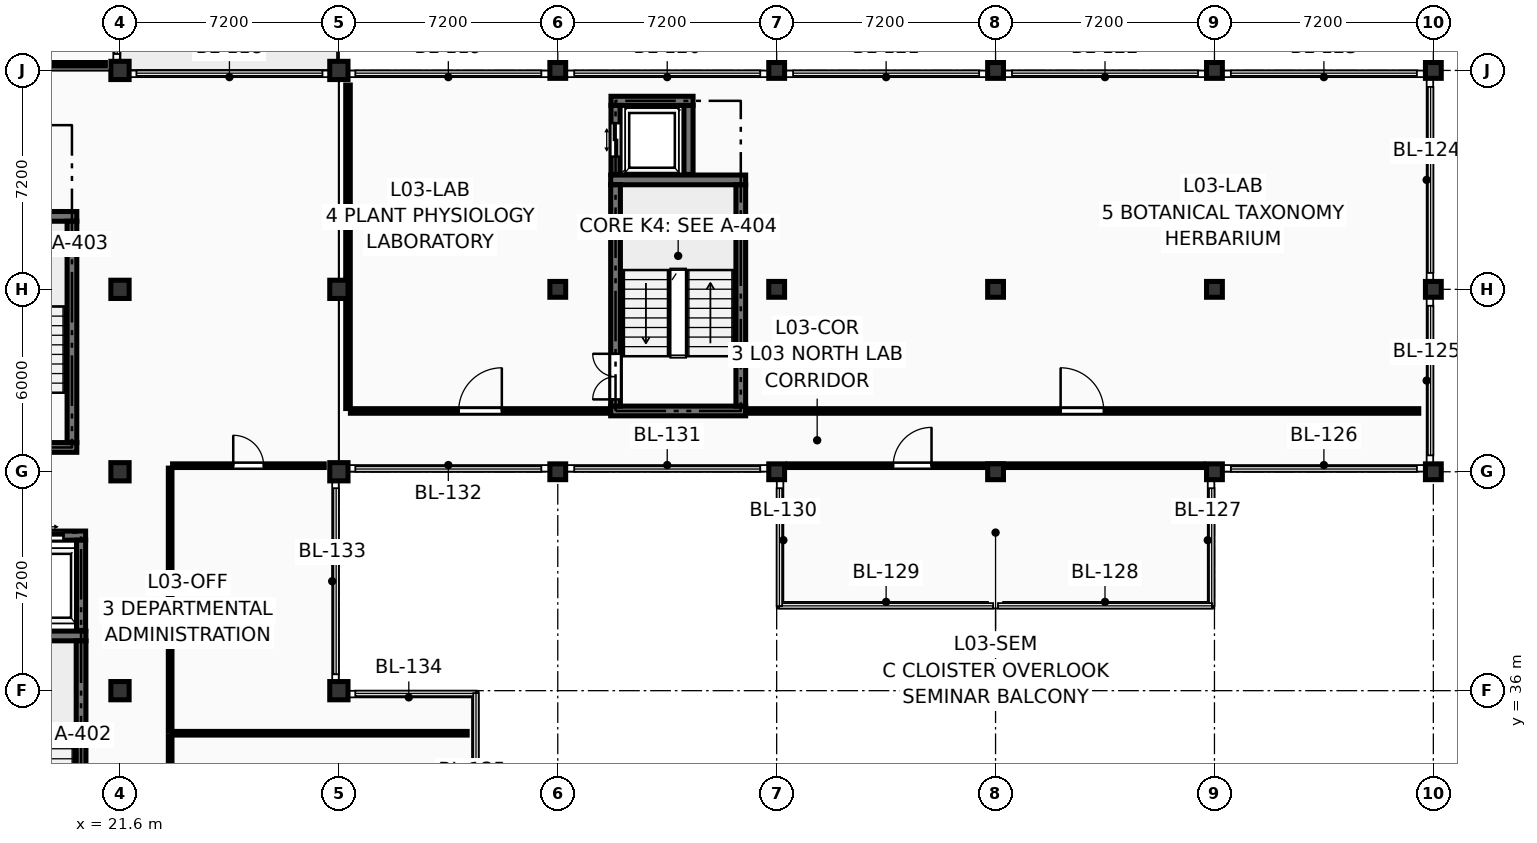
"""IFC4 building model, lengths in metres.
Left out: names, types, materials, properties, quantities, classifications, styles, units other than length and angle.
Written with IfcOpenShell. Run it as: python <this file> out.ifc"""

import sys

from ifc_helpers import new_model, si_unit, direction, frame, frame_2d, origin, origin_2d, place, context, subcontext, project, spatial, rectangle, extrude, element, fill, save


model = new_model("IFC4")
c1 = context("Model", 3, precision=1e-05, world=origin(), true_north=direction((0.0, 1.0)))
c2 = subcontext(c1, "Body", "Model", "MODEL_VIEW")
j1 = project(units=[si_unit("LENGTHUNIT", "METRE"), si_unit("PLANEANGLEUNIT", "RADIAN")], contexts=[c1])
p1 = place(None, origin())
s1 = spatial("IfcSite", under=j1, at=p1, CompositionType="ELEMENT")
p2 = place(p1, origin())
s2 = spatial("IfcBuilding", under=s1, at=p2, CompositionType="ELEMENT")
p3 = place(p2, frame((0.0, 0.0, 12.15)))
s3 = spatial("IfcBuildingStorey", under=s2, at=p3, CompositionType="ELEMENT", Elevation=12.15)
for number, where, z_axis, x_axis in (
    (1, (21.6, 36.0, 0.0), (0.0, 0.0, 1.0), (1.0, 0.0, 0.0)),
    (2, (21.6, 43.2, 0.0), (0.0, 0.0, 1.0), (1.0, 0.0, 0.0)),
    (3, (21.6, 49.2, 0.0), (0.0, 0.0, 1.0), (1.0, 0.0, 0.0)),
    (4, (21.6, 56.4, 0.0), (0.0, 0.0, 1.0), (1.0, 0.0, 0.0)),
    (5, (28.8, 36.0, 0.0), (0.0, 0.0, 1.0), (1.0, 0.0, 0.0)),
    (6, (28.8, 43.2, 0.0), (0.0, 0.0, 1.0), (1.0, 0.0, 0.0)),
    (7, (28.8, 49.2, 0.0), (0.0, 0.0, 1.0), (1.0, 0.0, 0.0)),
    (8, (28.8, 56.4, 0.0), (0.0, 0.0, 1.0), (1.0, 0.0, 0.0)),
):
    element("IfcColumn", number, at=place(p3, frame(where, z_axis=z_axis, x_axis=x_axis)), inside=s3, PredefinedType="COLUMN", context=c2, shape_type="SweptSolid", body=[
        extrude(rectangle(XDim=0.6, YDim=0.6, at=origin_2d()), origin(), (0.0, 0.0, 1.0), 3.6),
    ])
for number, where, z_axis, x_axis in (
    (9, (36.0, 43.2, 0.0), (0.0, 0.0, 1.0), (1.0, 0.0, 0.0)),
    (10, (36.0, 49.2, 0.0), (0.0, 0.0, 1.0), (1.0, 0.0, 0.0)),
    (11, (36.0, 56.4, 0.0), (0.0, 0.0, 1.0), (1.0, 0.0, 0.0)),
    (12, (43.2, 43.2, 0.0), (0.0, 0.0, 1.0), (1.0, 0.0, 0.0)),
    (13, (43.2, 49.2, 0.0), (0.0, 0.0, 1.0), (1.0, 0.0, 0.0)),
    (14, (43.2, 56.4, 0.0), (0.0, 0.0, 1.0), (1.0, 0.0, 0.0)),
    (15, (50.4, 43.2, 0.0), (0.0, 0.0, 1.0), (1.0, 0.0, 0.0)),
    (16, (50.4, 49.2, 0.0), (0.0, 0.0, 1.0), (1.0, 0.0, 0.0)),
    (17, (50.4, 56.4, 0.0), (0.0, 0.0, 1.0), (1.0, 0.0, 0.0)),
    (18, (57.6, 43.2, 0.0), (0.0, 0.0, 1.0), (1.0, 0.0, 0.0)),
    (19, (57.6, 49.2, 0.0), (0.0, 0.0, 1.0), (1.0, 0.0, 0.0)),
    (20, (57.6, 56.4, 0.0), (0.0, 0.0, 1.0), (1.0, 0.0, 0.0)),
    (21, (64.8, 43.2, 0.0), (0.0, 0.0, 1.0), (1.0, 0.0, 0.0)),
    (22, (64.8, 49.2, 0.0), (0.0, 0.0, 1.0), (1.0, 0.0, 0.0)),
    (23, (64.8, 56.4, 0.0), (0.0, 0.0, 1.0), (1.0, 0.0, 0.0)),
):
    element("IfcColumn", number, at=place(p3, frame(where, z_axis=z_axis, x_axis=x_axis)), inside=s3, PredefinedType="COLUMN", context=c2, shape_type="SweptSolid", body=[
        extrude(rectangle(XDim=0.52, YDim=0.52, at=origin_2d()), origin(), (0.0, 0.0, 1.0), 3.6),
    ])
p4 = place(p3, frame((15.64, 37.8, 0.0), z_axis=(0.0, 0.0, 1.0), x_axis=(1.0, 0.0, 0.0)))
e24 = element("IfcWall", 24, at=p4, inside=s3, PredefinedType="SHEAR", context=c2, shape_type="SweptSolid", body=[
    extrude(rectangle(XDim=4.84, YDim=0.32, at=frame_2d((2.42, 0.0))), origin(), (0.0, 0.0, 1.0), 3.39),
])
p5 = place(p3, frame((20.32, 29.96, 0.0), z_axis=(0.0, 0.0, 1.0), x_axis=(0.0, 1.0, 0.0)))
e25 = element("IfcWall", 25, at=p5, inside=s3, PredefinedType="SHEAR", context=c2, shape_type="SweptSolid", body=[
    extrude(rectangle(XDim=7.68, YDim=0.32, at=frame_2d((3.84, 0.0))), origin(), (0.0, 0.0, 1.0), 3.39),
])
for number, where, z_axis, x_axis in (
    (26, (15.74, 44.0, 0.0), (0.0, 0.0, 1.0), (1.0, 0.0, 0.0)),
    (27, (15.74, 51.6, 0.0), (0.0, 0.0, 1.0), (1.0, 0.0, 0.0)),
):
    element("IfcWall", number, at=place(p3, frame(where, z_axis=z_axis, x_axis=x_axis)), inside=s3, PredefinedType="SHEAR", context=c2, shape_type="SweptSolid", body=[
        extrude(rectangle(XDim=4.44, YDim=0.32, at=frame_2d((2.22, 0.0))), origin(), (0.0, 0.0, 1.0), 3.39),
    ])
p6 = place(p3, frame((20.02, 44.16, 0.0), z_axis=(0.0, 0.0, 1.0), x_axis=(0.0, 1.0, 0.0)))
e28 = element("IfcWall", 28, at=p6, inside=s3, PredefinedType="SHEAR", context=c2, shape_type="SweptSolid", body=[
    extrude(rectangle(XDim=7.28, YDim=0.32, at=frame_2d((3.64, 0.0))), origin(), (0.0, 0.0, 1.0), 3.39),
])
for number, where, z_axis, x_axis in (
    (29, (37.74, 45.2, 0.0), (0.0, 0.0, 1.0), (1.0, 0.0, 0.0)),
    (30, (37.74, 52.8, 0.0), (0.0, 0.0, 1.0), (1.0, 0.0, 0.0)),
):
    element("IfcWall", number, at=place(p3, frame(where, z_axis=z_axis, x_axis=x_axis)), inside=s3, PredefinedType="SHEAR", context=c2, shape_type="SweptSolid", body=[
        extrude(rectangle(XDim=4.44, YDim=0.32, at=frame_2d((2.22, 0.0))), origin(), (0.0, 0.0, 1.0), 3.39),
    ])
p7 = place(p3, frame((37.9, 45.36, 0.0), z_axis=(0.0, 0.0, 1.0), x_axis=(0.0, 1.0, 0.0)))
e31 = element("IfcWall", 31, at=p7, inside=s3, PredefinedType="SHEAR", context=c2, shape_type="SweptSolid", body=[
    extrude(rectangle(XDim=7.28, YDim=0.32, at=frame_2d((3.64, 0.0))), origin(), (0.0, 0.0, 1.0), 3.39),
])
p8 = place(p7, frame((0.22, 0.0, 0.0)))
e32 = element("IfcOpeningElement", 32, at=p8, cuts=e31, PredefinedType="OPENING", context=c2, shape_type="SweptSolid", body=[
    extrude(rectangle(XDim=1.5, YDim=2.2, at=frame_2d((0.75, 1.1))), frame((0.0, 0.172, 0.0), z_axis=(0.0, -1.0, 0.0), x_axis=(1.0, 0.0, 0.0)), (0.0, 0.0, 1.0), 0.344),
])
p9 = place(p3, frame((42.02, 45.36, 0.0), z_axis=(0.0, 0.0, 1.0), x_axis=(0.0, 1.0, 0.0)))
e33 = element("IfcWall", 33, at=p9, inside=s3, PredefinedType="SHEAR", context=c2, shape_type="SweptSolid", body=[
    extrude(rectangle(XDim=7.28, YDim=0.32, at=frame_2d((3.64, 0.0))), origin(), (0.0, 0.0, 1.0), 3.39),
])
p10 = place(p3, frame((17.91, 41.1, 0.0), z_axis=(0.0, 0.0, 1.0), x_axis=(1.0, 0.0, 0.0)))
e34 = element("IfcWall", 34, at=p10, inside=s3, PredefinedType="SHEAR", context=c2, shape_type="SweptSolid", body=[
    extrude(rectangle(XDim=2.56, YDim=0.3, at=frame_2d((1.28, 0.0))), origin(), (0.0, 0.0, 1.0), 3.39),
])
p11 = place(p10, frame((0.73, 0.0, 0.0)))
e35 = element("IfcOpeningElement", 35, at=p11, cuts=e34, PredefinedType="OPENING", context=c2, shape_type="SweptSolid", body=[
    extrude(rectangle(XDim=1.1, YDim=2.2, at=frame_2d((0.55, 1.1))), frame((0.0, 0.162, 0.0), z_axis=(0.0, -1.0, 0.0), x_axis=(1.0, 0.0, 0.0)), (0.0, 0.0, 1.0), 0.324),
])
p12 = place(p3, frame((20.32, 37.98, 0.0), z_axis=(0.0, 0.0, 1.0), x_axis=(0.0, 1.0, 0.0)))
e36 = element("IfcWall", 36, at=p12, inside=s3, PredefinedType="SHEAR", context=c2, shape_type="SweptSolid", body=[
    extrude(rectangle(XDim=2.97, YDim=0.3, at=frame_2d((1.485, 0.0))), origin(), (0.0, 0.0, 1.0), 3.39),
])
p13 = place(p3, frame((37.75, 55.4, 0.0), z_axis=(0.0, 0.0, 1.0), x_axis=(1.0, 0.0, 0.0)))
e37 = element("IfcWall", 37, at=p13, inside=s3, PredefinedType="SHEAR", context=c2, shape_type="SweptSolid", body=[
    extrude(rectangle(XDim=2.7, YDim=0.3, at=frame_2d((1.35, 0.0))), origin(), (0.0, 0.0, 1.0), 3.39),
])
p14 = place(p3, frame((37.9, 52.98, 0.0), z_axis=(0.0, 0.0, 1.0), x_axis=(0.0, 1.0, 0.0)))
e38 = element("IfcWall", 38, at=p14, inside=s3, PredefinedType="SHEAR", context=c2, shape_type="SweptSolid", body=[
    extrude(rectangle(XDim=2.27, YDim=0.3, at=frame_2d((1.135, 0.0))), origin(), (0.0, 0.0, 1.0), 3.39),
])
p15 = place(p14, frame((0.585, 0.0, 0.0)))
e39 = element("IfcOpeningElement", 39, at=p15, cuts=e38, PredefinedType="OPENING", context=c2, shape_type="SweptSolid", body=[
    extrude(rectangle(XDim=1.1, YDim=2.2, at=frame_2d((0.55, 1.1))), frame((0.0, 0.162, 0.0), z_axis=(0.0, -1.0, 0.0), x_axis=(1.0, 0.0, 0.0)), (0.0, 0.0, 1.0), 0.324),
])
p16 = place(p3, frame((40.3, 52.98, 0.0), z_axis=(0.0, 0.0, 1.0), x_axis=(0.0, 1.0, 0.0)))
e40 = element("IfcWall", 40, at=p16, inside=s3, PredefinedType="SHEAR", context=c2, shape_type="SweptSolid", body=[
    extrude(rectangle(XDim=2.27, YDim=0.3, at=frame_2d((1.135, 0.0))), origin(), (0.0, 0.0, 1.0), 3.39),
])
p17 = place(p3, frame((23.25, 21.68, 0.0), z_axis=(0.0, 0.0, 1.0), x_axis=(0.0, 1.0, 0.0)))
e41 = element("IfcWall", 41, at=p17, inside=s3, PredefinedType="PARTITIONING", context=c2, shape_type="SweptSolid", body=[
    extrude(rectangle(XDim=12.84, YDim=0.12, at=frame_2d((6.42, 0.0))), origin(), (0.0, 0.0, 1.0), 3.375),
])
p18 = place(p17, frame((4.495, 0.0, 0.0)))
e42 = element("IfcOpeningElement", 42, at=p18, cuts=e41, PredefinedType="OPENING", context=c2, shape_type="SweptSolid", body=[
    extrude(rectangle(XDim=1.0, YDim=2.15, at=frame_2d((0.5, 1.075))), frame((0.0, 0.072, 0.0), z_axis=(0.0, -1.0, 0.0), x_axis=(1.0, 0.0, 0.0)), (0.0, 0.0, 1.0), 0.144),
])
p19 = place(p3, frame((23.33, 34.6, 0.0), z_axis=(0.0, 0.0, 1.0), x_axis=(1.0, 0.0, 0.0)))
e43 = element("IfcWall", 43, at=p19, inside=s3, PredefinedType="PARTITIONING", context=c2, shape_type="SweptSolid", body=[
    extrude(rectangle(XDim=9.69, YDim=0.12, at=frame_2d((4.845, 0.0))), origin(), (0.0, 0.0, 1.0), 3.375),
])
p20 = place(p3, frame((23.25, 34.68, 0.0), z_axis=(0.0, 0.0, 1.0), x_axis=(0.0, 1.0, 0.0)))
e44 = element("IfcWall", 44, at=p20, inside=s3, PredefinedType="PARTITIONING", context=c2, shape_type="SweptSolid", body=[
    extrude(rectangle(XDim=8.64, YDim=0.12, at=frame_2d((4.32, 0.0))), origin(), (0.0, 0.0, 1.0), 3.375),
])
p21 = place(p3, frame((23.33, 43.4, 0.0), z_axis=(0.0, 0.0, 1.0), x_axis=(1.0, 0.0, 0.0)))
e45 = element("IfcWall", 45, at=p21, inside=s3, PredefinedType="PARTITIONING", context=c2, shape_type="SweptSolid", body=[
    extrude(rectangle(XDim=4.99, YDim=0.12, at=frame_2d((2.495, 0.0))), origin(), (0.0, 0.0, 1.0), 2.691),
])
p22 = place(p21, frame((1.995, 0.0, 0.0)))
e46 = element("IfcOpeningElement", 46, at=p22, cuts=e45, PredefinedType="OPENING", context=c2, shape_type="SweptSolid", body=[
    extrude(rectangle(XDim=1.0, YDim=2.15, at=frame_2d((0.5, 1.075))), frame((0.0, 0.072, 0.0), z_axis=(0.0, -1.0, 0.0), x_axis=(1.0, 0.0, 0.0)), (0.0, 0.0, 1.0), 0.144),
])
p23 = place(p3, frame((29.1, 45.28, 0.0), z_axis=(0.0, 0.0, 1.0), x_axis=(0.0, 1.0, 0.0)))
e47 = element("IfcWall", 47, at=p23, inside=s3, PredefinedType="PARTITIONING", context=c2, shape_type="SweptSolid", body=[
    extrude(rectangle(XDim=10.64, YDim=0.15, at=frame_2d((5.32, 0.0))), origin(), (0.0, 0.0, 1.0), 2.655),
])
p24 = place(p3, frame((29.18, 45.2, 0.0), z_axis=(0.0, 0.0, 1.0), x_axis=(1.0, 0.0, 0.0)))
e48 = element("IfcWall", 48, at=p24, inside=s3, PredefinedType="PARTITIONING", context=c2, shape_type="SweptSolid", body=[
    extrude(rectangle(XDim=8.54, YDim=0.15, at=frame_2d((4.27, 0.0))), origin(), (0.0, 0.0, 1.0), 3.375),
])
p25 = place(p24, frame((3.56, 0.0, 0.0)))
e49 = element("IfcOpeningElement", 49, at=p25, cuts=e48, PredefinedType="OPENING", context=c2, shape_type="SweptSolid", body=[
    extrude(rectangle(XDim=1.42, YDim=2.22, at=frame_2d((0.71, 1.11))), frame((0.0, 0.087, 0.0), z_axis=(0.0, -1.0, 0.0), x_axis=(1.0, 0.0, 0.0)), (0.0, 0.0, 1.0), 0.174),
])
p26 = place(p3, frame((42.18, 45.2, 0.0), z_axis=(0.0, 0.0, 1.0), x_axis=(1.0, 0.0, 0.0)))
e50 = element("IfcWall", 50, at=p26, inside=s3, PredefinedType="PARTITIONING", context=c2, shape_type="SweptSolid", body=[
    extrude(rectangle(XDim=22.14, YDim=0.15, at=frame_2d((11.07, 0.0))), origin(), (0.0, 0.0, 1.0), 3.375),
])
p27 = place(p26, frame((10.36, 0.0, 0.0)))
e51 = element("IfcOpeningElement", 51, at=p27, cuts=e50, PredefinedType="OPENING", context=c2, shape_type="SweptSolid", body=[
    extrude(rectangle(XDim=1.42, YDim=2.22, at=frame_2d((0.71, 1.11))), frame((0.0, 0.087, 0.0), z_axis=(0.0, -1.0, 0.0), x_axis=(1.0, 0.0, 0.0)), (0.0, 0.0, 1.0), 0.174),
])
p28 = place(p3, frame((43.58, 43.4, 0.0), z_axis=(0.0, 0.0, 1.0), x_axis=(1.0, 0.0, 0.0)))
e52 = element("IfcWall", 52, at=p28, inside=s3, PredefinedType="PARTITIONING", context=c2, shape_type="SweptSolid", body=[
    extrude(rectangle(XDim=13.64, YDim=0.12, at=frame_2d((6.82, 0.0))), origin(), (0.0, 0.0, 1.0), 2.595),
])
p29 = place(p28, frame((3.454, 0.0, 0.0)))
e53 = element("IfcOpeningElement", 53, at=p29, cuts=e52, PredefinedType="OPENING", context=c2, shape_type="SweptSolid", body=[
    extrude(rectangle(XDim=1.26, YDim=2.18, at=frame_2d((0.63, 1.09))), frame((0.0, 0.072, 0.0), z_axis=(0.0, -1.0, 0.0), x_axis=(1.0, 0.0, 0.0)), (0.0, 0.0, 1.0), 0.144),
])
p30 = place(p3, frame((16.08, 56.6, 0.0), z_axis=(0.0, 0.0, 1.0), x_axis=(1.0, 0.0, 0.0)))
e54 = element("IfcWall", 54, at=p30, inside=s3, PredefinedType="PARTITIONING", context=c2, shape_type="SweptSolid", body=[
    extrude(rectangle(XDim=5.04, YDim=0.12, at=frame_2d((2.52, 0.0))), origin(), (0.0, 0.0, 1.0), 2.691),
])
p31 = place(p8, origin())
e55 = element("IfcDoor", 55, at=p31, inside=s3, OperationType="DOUBLE_DOOR_SINGLE_SWING", PredefinedType="DOOR", context=c2, shape_type="SweptSolid", body=[
    extrude(rectangle(XDim=1.5, YDim=2.2, at=frame_2d((0.75, 1.1))), frame((0.0, 0.025, 0.0), z_axis=(0.0, -1.0, 0.0), x_axis=(1.0, 0.0, 0.0)), (0.0, 0.0, 1.0), 0.05),
])
fill(e32, e55)
p32 = place(p11, origin())
e56 = element("IfcDoor", 56, at=p32, inside=s3, OperationType="DOUBLE_DOOR_SLIDING", PredefinedType="DOOR", context=c2, shape_type="SweptSolid", body=[
    extrude(rectangle(XDim=1.1, YDim=2.2, at=frame_2d((0.55, 1.1))), frame((0.0, 0.025, 0.0), z_axis=(0.0, -1.0, 0.0), x_axis=(1.0, 0.0, 0.0)), (0.0, 0.0, 1.0), 0.05),
])
fill(e35, e56)
p33 = place(p15, origin())
e57 = element("IfcDoor", 57, at=p33, inside=s3, OperationType="DOUBLE_DOOR_SLIDING", PredefinedType="DOOR", context=c2, shape_type="SweptSolid", body=[
    extrude(rectangle(XDim=1.1, YDim=2.2, at=frame_2d((0.55, 1.1))), frame((0.0, 0.025, 0.0), z_axis=(0.0, -1.0, 0.0), x_axis=(1.0, 0.0, 0.0)), (0.0, 0.0, 1.0), 0.05),
])
fill(e39, e57)
p34 = place(p22, origin())
e58 = element("IfcDoor", 58, at=p34, inside=s3, OperationType="SINGLE_SWING_LEFT", PredefinedType="DOOR", context=c2, shape_type="SweptSolid", body=[
    extrude(rectangle(XDim=1.0, YDim=2.15, at=frame_2d((0.5, 1.075))), frame((0.0, 0.025, 0.0), z_axis=(0.0, -1.0, 0.0), x_axis=(1.0, 0.0, 0.0)), (0.0, 0.0, 1.0), 0.05),
])
fill(e46, e58)
p35 = place(p25, origin())
e59 = element("IfcDoor", 59, at=p35, inside=s3, OperationType="SINGLE_SWING_RIGHT", PredefinedType="DOOR", context=c2, shape_type="SweptSolid", body=[
    extrude(rectangle(XDim=1.42, YDim=2.22, at=frame_2d((0.71, 1.11))), frame((0.0, 0.025, 0.0), z_axis=(0.0, -1.0, 0.0), x_axis=(1.0, 0.0, 0.0)), (0.0, 0.0, 1.0), 0.05),
])
fill(e49, e59)
p36 = place(p27, origin())
e60 = element("IfcDoor", 60, at=p36, inside=s3, OperationType="SINGLE_SWING_LEFT", PredefinedType="DOOR", context=c2, shape_type="SweptSolid", body=[
    extrude(rectangle(XDim=1.42, YDim=2.22, at=frame_2d((0.71, 1.11))), frame((0.0, 0.025, 0.0), z_axis=(0.0, -1.0, 0.0), x_axis=(1.0, 0.0, 0.0)), (0.0, 0.0, 1.0), 0.05),
])
fill(e51, e60)
p37 = place(p29, origin())
e61 = element("IfcDoor", 61, at=p37, inside=s3, OperationType="SINGLE_SWING_RIGHT", PredefinedType="DOOR", context=c2, shape_type="SweptSolid", body=[
    extrude(rectangle(XDim=1.26, YDim=2.18, at=frame_2d((0.63, 1.09))), frame((0.0, 0.025, 0.0), z_axis=(0.0, -1.0, 0.0), x_axis=(1.0, 0.0, 0.0)), (0.0, 0.0, 1.0), 0.05),
])
fill(e53, e61)
save(model, sys.argv[1])
